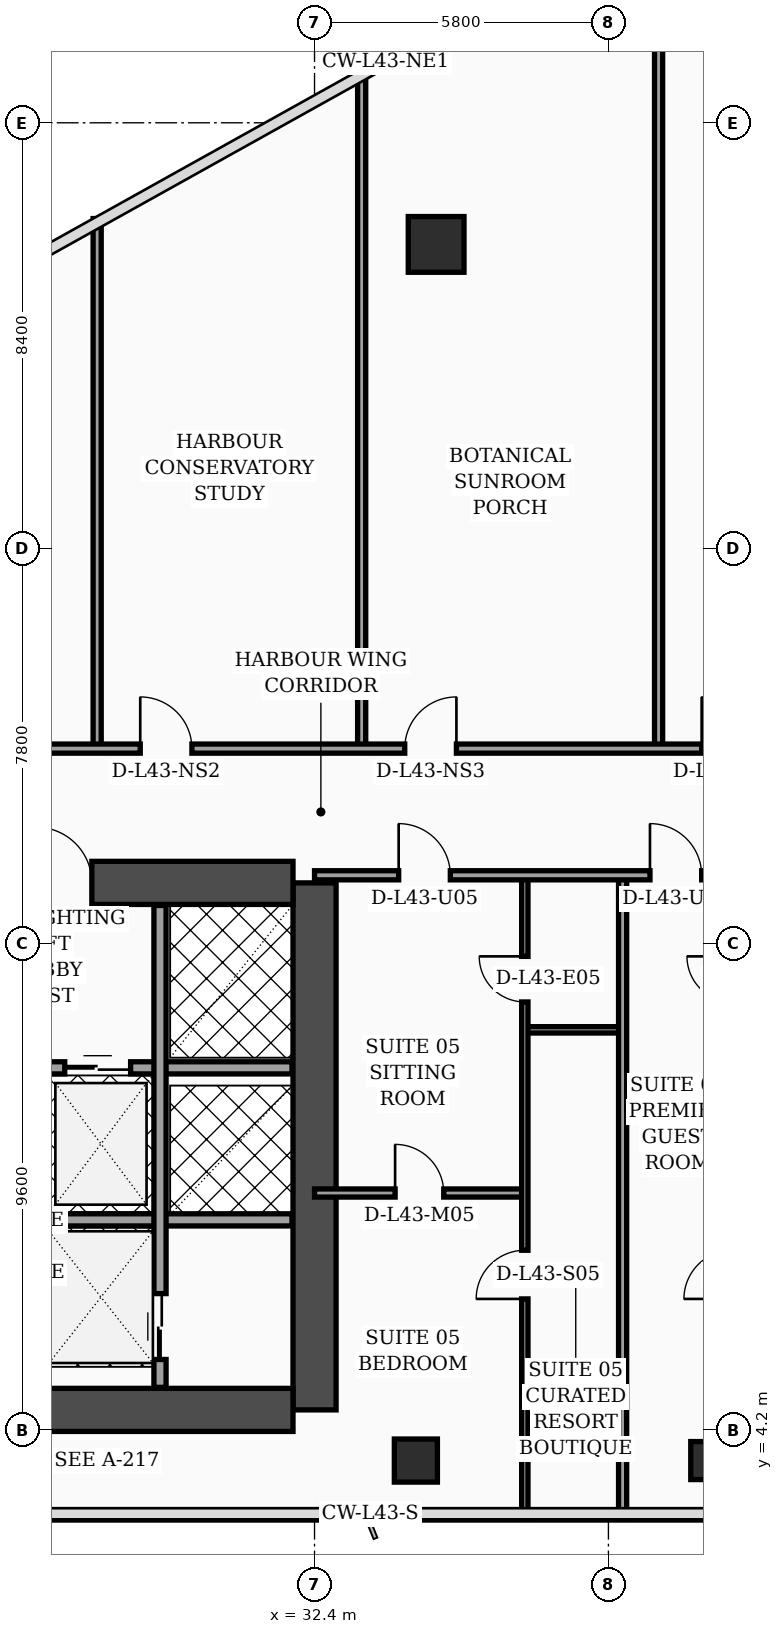
"""IFC4 building model, lengths in metres.
Left out: names, types, materials, properties, quantities, classifications, styles, units other than length and angle.
Written with IfcOpenShell. Run it as: python <this file> out.ifc"""

import sys

from ifc_helpers import new_model, si_unit, direction, frame, frame_2d, origin, origin_2d, place, context, subcontext, project, spatial, rectangle, hollow_rectangle, circle, extrude, element, fill, save


model = new_model("IFC4")
c1 = context("Model", 3, precision=1e-05, world=origin(), true_north=direction((0.0, 1.0)))
c2 = subcontext(c1, "Body", "Model", "MODEL_VIEW")
j1 = project(units=[si_unit("LENGTHUNIT", "METRE"), si_unit("PLANEANGLEUNIT", "RADIAN")], contexts=[c1])
p1 = place(None, origin())
s1 = spatial("IfcSite", under=j1, at=p1, CompositionType="ELEMENT")
p2 = place(p1, origin())
s2 = spatial("IfcBuilding", under=s1, at=p2, CompositionType="ELEMENT")
p3 = place(p2, frame((0.0, 0.0, 175.1)))
s3 = spatial("IfcBuildingStorey", under=s2, at=p3, CompositionType="ELEMENT", Elevation=175.1)
p4 = place(p3, frame((32.4, 4.6, 0.0), z_axis=(0.0, 0.0, 1.0), x_axis=(0.0, 1.0, 0.0)))
e1 = element("IfcWall", 1, at=p4, inside=s3, PredefinedType="SHEAR", context=c2, shape_type="SweptSolid", body=[
    extrude(rectangle(XDim=10.4, YDim=0.85, at=frame_2d((5.2, 0.0))), origin(), (0.0, 0.0, 1.0), 3.56),
])
p5 = place(p3, frame((22.025, 15.0, 0.0), z_axis=(0.0, 0.0, 1.0), x_axis=(1.0, 0.0, 0.0)))
e2 = element("IfcWall", 2, at=p5, inside=s3, PredefinedType="SHEAR", context=c2, shape_type="SweptSolid", body=[
    extrude(rectangle(XDim=9.95, YDim=0.85, at=frame_2d((4.975, 0.0))), origin(), (0.0, 0.0, 1.0), 3.56),
])
p6 = place(p5, frame((4.88, 0.0, 0.0)))
e3 = element("IfcOpeningElement", 3, at=p6, cuts=e2, PredefinedType="OPENING", context=c2, shape_type="SweptSolid", body=[
    extrude(rectangle(XDim=1.1, YDim=2.2, at=frame_2d((0.55, 1.1))), frame((0.0, 0.435, 0.0), z_axis=(0.0, -1.0, 0.0), x_axis=(1.0, 0.0, 0.0)), (0.0, 0.0, 1.0), 0.87),
])
p7 = place(p3, frame((22.025, 4.6, 0.0), z_axis=(0.0, 0.0, 1.0), x_axis=(1.0, 0.0, 0.0)))
e4 = element("IfcWall", 4, at=p7, inside=s3, PredefinedType="SHEAR", context=c2, shape_type="SweptSolid", body=[
    extrude(rectangle(XDim=9.95, YDim=0.85, at=frame_2d((4.975, 0.0))), origin(), (0.0, 0.0, 1.0), 3.56),
])
p8 = place(p3, frame((34.4, 3.6, 0.0), z_axis=(0.0, 0.0, 1.0), x_axis=(1.0, 0.0, 0.0)))
e5 = element("IfcColumn", 5, at=p8, inside=s3, PredefinedType="COLUMN", context=c2, shape_type="SweptSolid", body=[
    extrude(hollow_rectangle(XDim=0.85, YDim=0.85, WallThickness=0.036, at=origin_2d()), origin(), (0.0, 0.0, 1.0), 3.56),
])
p9 = place(p3, frame((40.2, 3.6, 0.0), z_axis=(0.0, 0.0, 1.0), x_axis=(1.0, 0.0, 0.0)))
e6 = element("IfcColumn", 6, at=p9, inside=s3, PredefinedType="COLUMN", context=c2, shape_type="SweptSolid", body=[
    extrude(hollow_rectangle(XDim=0.75, YDim=0.75, WallThickness=0.032, at=origin_2d()), origin(), (0.0, 0.0, 1.0), 3.56),
])
p10 = place(p3, frame((34.8, 27.6, 0.0), z_axis=(0.0, 0.0, 1.0), x_axis=(1.0, 0.0, 0.0)))
e7 = element("IfcColumn", 7, at=p10, inside=s3, PredefinedType="COLUMN", context=c2, shape_type="SweptSolid", body=[
    extrude(circle(Radius=0.55, at=origin_2d()), origin(), (0.0, 0.0, 1.0), 3.56),
])
p11 = place(p3, frame((27.02, 11.35, 0.0), z_axis=(0.0, 0.0, 1.0), x_axis=(1.0, 0.0, 0.0)))
e8 = element("IfcWall", 8, at=p11, inside=s3, PredefinedType="SOLIDWALL", context=c2, shape_type="SweptSolid", body=[
    extrude(rectangle(XDim=4.935, YDim=0.24, at=frame_2d((2.468, 0.0))), origin(), (0.0, 0.0, 1.0), 3.56),
])
p12 = place(p11, frame((0.45, 0.0, 0.0)))
e9 = element("IfcOpeningElement", 9, at=p12, cuts=e8, PredefinedType="OPENING", context=c2, shape_type="SweptSolid", body=[
    extrude(rectangle(XDim=1.3, YDim=2.35, at=frame_2d((0.65, 1.175))), frame((0.0, 0.13, 0.0), z_axis=(0.0, -1.0, 0.0), x_axis=(1.0, 0.0, 0.0)), (0.0, 0.0, 1.0), 0.26),
])
p13 = place(p3, frame((27.02, 8.35, 0.0), z_axis=(0.0, 0.0, 1.0), x_axis=(1.0, 0.0, 0.0)))
e10 = element("IfcWall", 10, at=p13, inside=s3, PredefinedType="SOLIDWALL", context=c2, shape_type="SweptSolid", body=[
    extrude(rectangle(XDim=4.935, YDim=0.24, at=frame_2d((2.468, 0.0))), origin(), (0.0, 0.0, 1.0), 3.56),
])
p14 = place(p3, frame((29.35, 5.045, 0.0), z_axis=(0.0, 0.0, 1.0), x_axis=(0.0, 1.0, 0.0)))
e11 = element("IfcWall", 11, at=p14, inside=s3, PredefinedType="SOLIDWALL", context=c2, shape_type="SweptSolid", body=[
    extrude(rectangle(XDim=9.51, YDim=0.24, at=frame_2d((4.755, 0.0))), origin(), (0.0, 0.0, 1.0), 3.56),
])
p15 = place(p14, frame((0.55, 0.0, 0.0)))
e12 = element("IfcOpeningElement", 12, at=p15, cuts=e11, PredefinedType="OPENING", context=c2, shape_type="SweptSolid", body=[
    extrude(rectangle(XDim=1.3, YDim=2.35, at=frame_2d((0.65, 1.175))), frame((0.0, 0.13, 0.0), z_axis=(0.0, -1.0, 0.0), x_axis=(1.0, 0.0, 0.0)), (0.0, 0.0, 1.0), 0.26),
])
p16 = place(p3, frame((36.55, 12.1, 0.0), z_axis=(0.0, 0.0, 1.0), x_axis=(1.0, 0.0, 0.0)))
e13 = element("IfcWall", 13, at=p16, inside=s3, PredefinedType="PARTITIONING", context=c2, shape_type="SweptSolid", body=[
    extrude(rectangle(XDim=1.93, YDim=0.125, at=frame_2d((0.965, 0.0))), origin(), (0.0, 0.0, 1.0), 3.56),
])
p17 = place(p3, frame((32.4, 8.88, 0.0), z_axis=(0.0, 0.0, 1.0), x_axis=(1.0, 0.0, 0.0)))
e14 = element("IfcWall", 14, at=p17, inside=s3, PredefinedType="PARTITIONING", context=c2, shape_type="SweptSolid", body=[
    extrude(rectangle(XDim=4.15, YDim=0.16, at=frame_2d((2.075, 0.0))), origin(), (0.0, 0.0, 1.0), 2.94),
])
p18 = place(p17, frame((1.59, 0.0, 0.0)))
e15 = element("IfcOpeningElement", 15, at=p18, cuts=e14, PredefinedType="OPENING", context=c2, shape_type="SweptSolid", body=[
    extrude(rectangle(XDim=0.96, YDim=2.2, at=frame_2d((0.48, 1.1))), frame((0.0, 0.09, 0.0), z_axis=(0.0, -1.0, 0.0), x_axis=(1.0, 0.0, 0.0)), (0.0, 0.0, 1.0), 0.18),
])
p19 = place(p3, frame((36.55, 2.44, 0.0), z_axis=(0.0, 0.0, 1.0), x_axis=(0.0, 1.0, 0.0)))
e16 = element("IfcWall", 16, at=p19, inside=s3, PredefinedType="PARTITIONING", context=c2, shape_type="SweptSolid", body=[
    extrude(rectangle(XDim=12.71, YDim=0.125, at=frame_2d((6.355, 0.0))), origin(), (0.0, 0.0, 1.0), 2.94),
])
p20 = place(p19, frame((4.35, 0.0, 0.0)))
e17 = element("IfcOpeningElement", 17, at=p20, cuts=e16, PredefinedType="OPENING", context=c2, shape_type="SweptSolid", body=[
    extrude(rectangle(XDim=0.96, YDim=2.2, at=frame_2d((0.48, 1.1))), frame((0.0, 0.073, 0.0), z_axis=(0.0, -1.0, 0.0), x_axis=(1.0, 0.0, 0.0)), (0.0, 0.0, 1.0), 0.145),
])
p21 = place(p19, frame((10.21, 0.0, 0.0)))
e18 = element("IfcOpeningElement", 18, at=p21, cuts=e16, PredefinedType="OPENING", context=c2, shape_type="SweptSolid", body=[
    extrude(rectangle(XDim=0.9, YDim=2.15, at=frame_2d((0.45, 1.075))), frame((0.0, 0.073, 0.0), z_axis=(0.0, -1.0, 0.0), x_axis=(1.0, 0.0, 0.0)), (0.0, 0.0, 1.0), 0.145),
])
p22 = place(p3, frame((38.48, 2.44, 0.0), z_axis=(0.0, 0.0, 1.0), x_axis=(0.0, 1.0, 0.0)))
e19 = element("IfcWall", 19, at=p22, inside=s3, PredefinedType="PARTITIONING", context=c2, shape_type="SweptSolid", body=[
    extrude(rectangle(XDim=12.71, YDim=0.16, at=frame_2d((6.355, 0.0))), origin(), (0.0, 0.0, 1.0), 2.94),
])
p23 = place(p3, frame((32.4, 15.15, 0.0), z_axis=(0.0, 0.0, 1.0), x_axis=(1.0, 0.0, 0.0)))
e20 = element("IfcWall", 20, at=p23, inside=s3, PredefinedType="PARTITIONING", context=c2, shape_type="SweptSolid", body=[
    extrude(rectangle(XDim=15.0, YDim=0.18, at=frame_2d((7.5, 0.0))), origin(), (0.0, 0.0, 1.0), 2.94),
])
p24 = place(p23, frame((1.66, 0.0, 0.0)))
e21 = element("IfcOpeningElement", 21, at=p24, cuts=e20, PredefinedType="OPENING", context=c2, shape_type="SweptSolid", body=[
    extrude(rectangle(XDim=1.02, YDim=2.2, at=frame_2d((0.51, 1.1))), frame((0.0, 0.1, 0.0), z_axis=(0.0, -1.0, 0.0), x_axis=(1.0, 0.0, 0.0)), (0.0, 0.0, 1.0), 0.2),
])
p25 = place(p23, frame((10.79, 0.0, 0.0)))
e22 = element("IfcOpeningElement", 22, at=p25, cuts=e20, PredefinedType="OPENING", context=c2, shape_type="SweptSolid", body=[
    extrude(rectangle(XDim=1.02, YDim=2.2, at=frame_2d((0.51, 1.1))), frame((0.0, 0.1, 0.0), z_axis=(0.0, -1.0, 0.0), x_axis=(1.0, 0.0, 0.0)), (0.0, 0.0, 1.0), 0.2),
])
p26 = place(p23, frame((6.62, 0.0, 0.0)))
e23 = element("IfcOpeningElement", 23, at=p26, cuts=e20, PredefinedType="OPENING", context=c2, shape_type="SweptSolid", body=[
    extrude(rectangle(XDim=1.02, YDim=2.2, at=frame_2d((0.51, 1.1))), frame((0.0, 0.1, 0.0), z_axis=(0.0, -1.0, 0.0), x_axis=(1.0, 0.0, 0.0)), (0.0, 0.0, 1.0), 0.2),
])
p27 = place(p3, frame((28.11, 17.65, 0.0), z_axis=(0.0, 0.0, 1.0), x_axis=(0.0, 1.0, 0.0)))
e24 = element("IfcWall", 24, at=p27, inside=s3, PredefinedType="PARTITIONING", context=c2, shape_type="SweptSolid", body=[
    extrude(rectangle(XDim=10.46, YDim=0.16, at=frame_2d((5.23, 0.0))), origin(), (0.0, 0.0, 1.0), 2.94),
])
p28 = place(p3, frame((33.33, 17.65, 0.0), z_axis=(0.0, 0.0, 1.0), x_axis=(0.0, 1.0, 0.0)))
e25 = element("IfcWall", 25, at=p28, inside=s3, PredefinedType="PARTITIONING", context=c2, shape_type="SweptSolid", body=[
    extrude(rectangle(XDim=13.37, YDim=0.16, at=frame_2d((6.685, 0.0))), origin(), (0.0, 0.0, 1.0), 2.94),
])
p29 = place(p3, frame((39.19, 17.65, 0.0), z_axis=(0.0, 0.0, 1.0), x_axis=(0.0, 1.0, 0.0)))
e26 = element("IfcWall", 26, at=p29, inside=s3, PredefinedType="PARTITIONING", context=c2, shape_type="SweptSolid", body=[
    extrude(rectangle(XDim=16.63, YDim=0.16, at=frame_2d((8.315, 0.0))), origin(), (0.0, 0.0, 1.0), 2.94),
])
p30 = place(p3, frame((21.5, 17.65, 0.0), z_axis=(0.0, 0.0, 1.0), x_axis=(1.0, 0.0, 0.0)))
e27 = element("IfcWall", 27, at=p30, inside=s3, PredefinedType="PARTITIONING", context=c2, shape_type="SweptSolid", body=[
    extrude(rectangle(XDim=23.55, YDim=0.18, at=frame_2d((11.775, 0.0))), origin(), (0.0, 0.0, 1.0), 2.94),
])
p31 = place(p30, frame((0.95, 0.0, 0.0)))
e28 = element("IfcOpeningElement", 28, at=p31, cuts=e27, PredefinedType="OPENING", context=c2, shape_type="SweptSolid", body=[
    extrude(rectangle(XDim=1.02, YDim=2.2, at=frame_2d((0.51, 1.1))), frame((0.0, 0.1, 0.0), z_axis=(0.0, -1.0, 0.0), x_axis=(1.0, 0.0, 0.0)), (0.0, 0.0, 1.0), 0.2),
])
p32 = place(p30, frame((7.46, 0.0, 0.0)))
e29 = element("IfcOpeningElement", 29, at=p32, cuts=e27, PredefinedType="OPENING", context=c2, shape_type="SweptSolid", body=[
    extrude(rectangle(XDim=1.02, YDim=2.2, at=frame_2d((0.51, 1.1))), frame((0.0, 0.1, 0.0), z_axis=(0.0, -1.0, 0.0), x_axis=(1.0, 0.0, 0.0)), (0.0, 0.0, 1.0), 0.2),
])
p33 = place(p30, frame((12.68, 0.0, 0.0)))
e30 = element("IfcOpeningElement", 30, at=p33, cuts=e27, PredefinedType="OPENING", context=c2, shape_type="SweptSolid", body=[
    extrude(rectangle(XDim=1.02, YDim=2.2, at=frame_2d((0.51, 1.1))), frame((0.0, 0.1, 0.0), z_axis=(0.0, -1.0, 0.0), x_axis=(1.0, 0.0, 0.0)), (0.0, 0.0, 1.0), 0.2),
])
p34 = place(p30, frame((18.54, 0.0, 0.0)))
e31 = element("IfcOpeningElement", 31, at=p34, cuts=e27, PredefinedType="OPENING", context=c2, shape_type="SweptSolid", body=[
    extrude(rectangle(XDim=1.02, YDim=2.2, at=frame_2d((0.51, 1.1))), frame((0.0, 0.1, 0.0), z_axis=(0.0, -1.0, 0.0), x_axis=(1.0, 0.0, 0.0)), (0.0, 0.0, 1.0), 0.2),
])
p35 = place(p12, origin())
e32 = element("IfcDoor", 32, at=p35, inside=s3, OperationType="DOUBLE_DOOR_SLIDING", PredefinedType="DOOR", context=c2, shape_type="SweptSolid", body=[
    extrude(rectangle(XDim=1.3, YDim=2.35, at=frame_2d((0.65, 1.175))), frame((0.0, 0.025, 0.0), z_axis=(0.0, -1.0, 0.0), x_axis=(1.0, 0.0, 0.0)), (0.0, 0.0, 1.0), 0.05),
])
fill(e9, e32)
p36 = place(p15, origin())
e33 = element("IfcDoor", 33, at=p36, inside=s3, OperationType="DOUBLE_DOOR_SLIDING", PredefinedType="DOOR", context=c2, shape_type="SweptSolid", body=[
    extrude(rectangle(XDim=1.3, YDim=2.35, at=frame_2d((0.65, 1.175))), frame((0.0, 0.025, 0.0), z_axis=(0.0, -1.0, 0.0), x_axis=(1.0, 0.0, 0.0)), (0.0, 0.0, 1.0), 0.05),
])
fill(e12, e33)
p37 = place(p18, origin())
e34 = element("IfcDoor", 34, at=p37, inside=s3, OperationType="SINGLE_SWING_LEFT", PredefinedType="DOOR", context=c2, shape_type="SweptSolid", body=[
    extrude(rectangle(XDim=0.96, YDim=2.2, at=frame_2d((0.48, 1.1))), frame((0.0, 0.025, 0.0), z_axis=(0.0, -1.0, 0.0), x_axis=(1.0, 0.0, 0.0)), (0.0, 0.0, 1.0), 0.05),
])
fill(e15, e34)
p38 = place(p20, origin())
e35 = element("IfcDoor", 35, at=p38, inside=s3, OperationType="SINGLE_SWING_LEFT", PredefinedType="DOOR", context=c2, shape_type="SweptSolid", body=[
    extrude(rectangle(XDim=0.96, YDim=2.2, at=frame_2d((0.48, 1.1))), frame((0.0, 0.025, 0.0), z_axis=(0.0, -1.0, 0.0), x_axis=(1.0, 0.0, 0.0)), (0.0, 0.0, 1.0), 0.05),
])
fill(e17, e35)
p39 = place(p21, origin())
e36 = element("IfcDoor", 36, at=p39, inside=s3, OperationType="SINGLE_SWING_RIGHT", PredefinedType="DOOR", context=c2, shape_type="SweptSolid", body=[
    extrude(rectangle(XDim=0.9, YDim=2.15, at=frame_2d((0.45, 1.075))), frame((0.0, 0.025, 0.0), z_axis=(0.0, -1.0, 0.0), x_axis=(1.0, 0.0, 0.0)), (0.0, 0.0, 1.0), 0.05),
])
fill(e18, e36)
p40 = place(p24, origin())
e37 = element("IfcDoor", 37, at=p40, inside=s3, OperationType="SINGLE_SWING_LEFT", PredefinedType="DOOR", context=c2, shape_type="SweptSolid", body=[
    extrude(rectangle(XDim=1.02, YDim=2.2, at=frame_2d((0.51, 1.1))), frame((0.0, 0.025, 0.0), z_axis=(0.0, -1.0, 0.0), x_axis=(1.0, 0.0, 0.0)), (0.0, 0.0, 1.0), 0.05),
])
fill(e21, e37)
p41 = place(p26, origin())
e38 = element("IfcDoor", 38, at=p41, inside=s3, OperationType="SINGLE_SWING_LEFT", PredefinedType="DOOR", context=c2, shape_type="SweptSolid", body=[
    extrude(rectangle(XDim=1.02, YDim=2.2, at=frame_2d((0.51, 1.1))), frame((0.0, 0.025, 0.0), z_axis=(0.0, -1.0, 0.0), x_axis=(1.0, 0.0, 0.0)), (0.0, 0.0, 1.0), 0.05),
])
fill(e23, e38)
p42 = place(p32, origin())
e39 = element("IfcDoor", 39, at=p42, inside=s3, OperationType="SINGLE_SWING_LEFT", PredefinedType="DOOR", context=c2, shape_type="SweptSolid", body=[
    extrude(rectangle(XDim=1.02, YDim=2.2, at=frame_2d((0.51, 1.1))), frame((0.0, 0.025, 0.0), z_axis=(0.0, -1.0, 0.0), x_axis=(1.0, 0.0, 0.0)), (0.0, 0.0, 1.0), 0.05),
])
fill(e29, e39)
p43 = place(p33, origin())
e40 = element("IfcDoor", 40, at=p43, inside=s3, OperationType="SINGLE_SWING_RIGHT", PredefinedType="DOOR", context=c2, shape_type="SweptSolid", body=[
    extrude(rectangle(XDim=1.02, YDim=2.2, at=frame_2d((0.51, 1.1))), frame((0.0, 0.025, 0.0), z_axis=(0.0, -1.0, 0.0), x_axis=(1.0, 0.0, 0.0)), (0.0, 0.0, 1.0), 0.05),
])
fill(e30, e40)
p44 = place(p34, origin())
e41 = element("IfcDoor", 41, at=p44, inside=s3, OperationType="SINGLE_SWING_LEFT", PredefinedType="DOOR", context=c2, shape_type="SweptSolid", body=[
    extrude(rectangle(XDim=1.02, YDim=2.2, at=frame_2d((0.51, 1.1))), frame((0.0, 0.025, 0.0), z_axis=(0.0, -1.0, 0.0), x_axis=(1.0, 0.0, 0.0)), (0.0, 0.0, 1.0), 0.05),
])
fill(e31, e41)
p45 = place(p6, origin())
e42 = element("IfcDoor", 42, at=p45, inside=s3, OperationType="SINGLE_SWING_LEFT", PredefinedType="DOOR", context=c2, shape_type="SweptSolid", body=[
    extrude(rectangle(XDim=1.1, YDim=2.2, at=frame_2d((0.55, 1.1))), frame((0.0, 0.025, 0.0), z_axis=(0.0, -1.0, 0.0), x_axis=(1.0, 0.0, 0.0)), (0.0, 0.0, 1.0), 0.05),
])
fill(e3, e42)
save(model, sys.argv[1])
